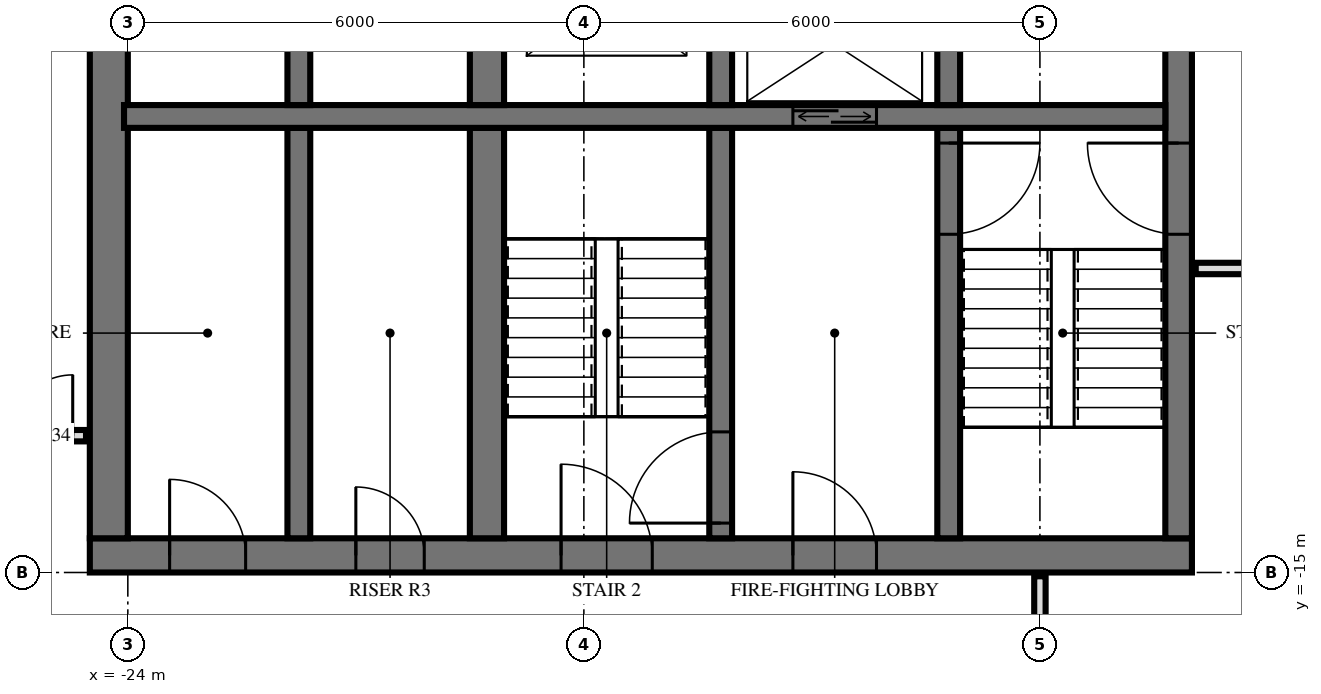
"""IFC4 building model, lengths in metres.
Left out: names, types, materials, properties, quantities, classifications, styles, units other than length and angle.
Written with IfcOpenShell. Run it as: python <this file> out.ifc"""

import sys

from ifc_helpers import new_model, si_unit, direction, frame, frame_2d, origin, place, context, subcontext, project, spatial, rectangle, extrude, element, fill, save


model = new_model("IFC4")
c1 = context("Model", 3, precision=1e-05, world=origin(), true_north=direction((0.0, 1.0)))
c2 = subcontext(c1, "Body", "Model", "MODEL_VIEW")
j1 = project(units=[si_unit("LENGTHUNIT", "METRE"), si_unit("PLANEANGLEUNIT", "RADIAN")], contexts=[c1])
p1 = place(None, origin())
s1 = spatial("IfcSite", under=j1, at=p1, CompositionType="ELEMENT")
p2 = place(p1, origin())
s2 = spatial("IfcBuilding", under=s1, at=p2, CompositionType="ELEMENT")
p3 = place(p2, frame((0.0, 0.0, 211.6)))
s3 = spatial("IfcBuildingStorey", under=s2, at=p3, CompositionType="ELEMENT", Elevation=211.6)
p4 = place(p3, frame((-24.5, -14.775, 0.0), z_axis=(0.0, 0.0, 1.0), x_axis=(1.0, 0.0, 0.0)))
e1 = element("IfcWall", 1, at=p4, inside=s3, PredefinedType="SHEAR", context=c2, shape_type="SweptSolid", body=[
    extrude(rectangle(XDim=14.5, YDim=0.45, at=frame_2d((7.25, 0.0))), origin(), (0.0, 0.0, 1.0), 3.5),
])
p5 = place(p4, frame((6.2, 0.0, 0.0)))
e2 = element("IfcOpeningElement", 2, at=p5, cuts=e1, PredefinedType="OPENING", context=c2, shape_type="SweptSolid", body=[
    extrude(rectangle(XDim=1.2, YDim=2.1, at=frame_2d((0.6, 1.05))), frame((0.0, 0.235, 0.0), z_axis=(0.0, -1.0, 0.0), x_axis=(1.0, 0.0, 0.0)), (0.0, 0.0, 1.0), 0.47),
])
p6 = place(p4, frame((9.25, 0.0, 0.0)))
e3 = element("IfcOpeningElement", 3, at=p6, cuts=e1, PredefinedType="OPENING", context=c2, shape_type="SweptSolid", body=[
    extrude(rectangle(XDim=1.1, YDim=2.1, at=frame_2d((0.55, 1.05))), frame((0.0, 0.235, 0.0), z_axis=(0.0, -1.0, 0.0), x_axis=(1.0, 0.0, 0.0)), (0.0, 0.0, 1.0), 0.47),
])
p7 = place(p4, frame((3.5, 0.0, 0.0)))
e4 = element("IfcOpeningElement", 4, at=p7, cuts=e1, PredefinedType="OPENING", context=c2, shape_type="SweptSolid", body=[
    extrude(rectangle(XDim=0.9, YDim=2.1, at=frame_2d((0.45, 1.05))), frame((0.0, 0.235, 0.0), z_axis=(0.0, -1.0, 0.0), x_axis=(1.0, 0.0, 0.0)), (0.0, 0.0, 1.0), 0.47),
])
p8 = place(p4, frame((1.05, 0.0, 0.0)))
e5 = element("IfcOpeningElement", 5, at=p8, cuts=e1, PredefinedType="OPENING", context=c2, shape_type="SweptSolid", body=[
    extrude(rectangle(XDim=1.0, YDim=2.1, at=frame_2d((0.5, 1.05))), frame((0.0, 0.235, 0.0), z_axis=(0.0, -1.0, 0.0), x_axis=(1.0, 0.0, 0.0)), (0.0, 0.0, 1.0), 0.47),
])
p9 = place(p3, frame((-10.175, -14.55, 0.0), z_axis=(0.0, 0.0, 1.0), x_axis=(0.0, 1.0, 0.0)))
e6 = element("IfcWall", 6, at=p9, inside=s3, PredefinedType="SHEAR", context=c2, shape_type="SweptSolid", body=[
    extrude(rectangle(XDim=14.1, YDim=0.35, at=frame_2d((7.05, 0.0))), origin(), (0.0, 0.0, 1.0), 3.5),
])
p10 = place(p9, frame((8.4, 0.0, 0.0)))
e7 = element("IfcOpeningElement", 7, at=p10, cuts=e6, PredefinedType="OPENING", context=c2, shape_type="SweptSolid", body=[
    extrude(rectangle(XDim=1.4, YDim=2.4, at=frame_2d((0.7, 1.2))), frame((0.0, 0.185, 0.0), z_axis=(0.0, -1.0, 0.0), x_axis=(1.0, 0.0, 0.0)), (0.0, 0.0, 1.0), 0.37),
])
p11 = place(p9, frame((10.0, 0.0, 0.0)))
e8 = element("IfcOpeningElement", 8, at=p11, cuts=e6, PredefinedType="OPENING", context=c2, shape_type="SweptSolid", body=[
    extrude(rectangle(XDim=1.4, YDim=2.4, at=frame_2d((0.7, 1.2))), frame((0.0, 0.185, 0.0), z_axis=(0.0, -1.0, 0.0), x_axis=(1.0, 0.0, 0.0)), (0.0, 0.0, 1.0), 0.37),
])
p12 = place(p9, frame((4.0, 0.0, 0.0)))
e9 = element("IfcOpeningElement", 9, at=p12, cuts=e6, PredefinedType="OPENING", context=c2, shape_type="SweptSolid", body=[
    extrude(rectangle(XDim=1.2, YDim=2.1, at=frame_2d((0.6, 1.05))), frame((0.0, 0.185, 0.0), z_axis=(0.0, -1.0, 0.0), x_axis=(1.0, 0.0, 0.0)), (0.0, 0.0, 1.0), 0.37),
])
p13 = place(p3, frame((-24.25, -14.55, 0.0), z_axis=(0.0, 0.0, 1.0), x_axis=(0.0, 1.0, 0.0)))
e10 = element("IfcWall", 10, at=p13, inside=s3, PredefinedType="SHEAR", context=c2, shape_type="SweptSolid", body=[
    extrude(rectangle(XDim=14.1, YDim=0.5, at=frame_2d((7.05, 0.0))), origin(), (0.0, 0.0, 1.0), 3.5),
])
p14 = place(p3, frame((-24.05, -9.0, 0.0), z_axis=(0.0, 0.0, 1.0), x_axis=(1.0, 0.0, 0.0)))
e11 = element("IfcWall", 11, at=p14, inside=s3, PredefinedType="SHEAR", context=c2, shape_type="SweptSolid", body=[
    extrude(rectangle(XDim=13.7, YDim=0.3, at=frame_2d((6.85, 0.0))), origin(), (0.0, 0.0, 1.0), 3.5),
])
p15 = place(p14, frame((8.8, 0.0, 0.0)))
e12 = element("IfcOpeningElement", 12, at=p15, cuts=e11, PredefinedType="OPENING", context=c2, shape_type="SweptSolid", body=[
    extrude(rectangle(XDim=1.1, YDim=2.1, at=frame_2d((0.55, 1.05))), frame((0.0, 0.16, 0.0), z_axis=(0.0, -1.0, 0.0), x_axis=(1.0, 0.0, 0.0)), (0.0, 0.0, 1.0), 0.32),
])
p16 = place(p3, frame((-13.2, -8.85, 0.0), z_axis=(0.0, 0.0, 1.0), x_axis=(0.0, 1.0, 0.0)))
e13 = element("IfcWall", 13, at=p16, inside=s3, PredefinedType="SHEAR", context=c2, shape_type="SweptSolid", body=[
    extrude(rectangle(XDim=2.3, YDim=0.3, at=frame_2d((1.15, 0.0))), origin(), (0.0, 0.0, 1.0), 3.5),
])
p17 = place(p3, frame((-13.2, -14.55, 0.0), z_axis=(0.0, 0.0, 1.0), x_axis=(0.0, 1.0, 0.0)))
e14 = element("IfcWall", 14, at=p17, inside=s3, PredefinedType="SHEAR", context=c2, shape_type="SweptSolid", body=[
    extrude(rectangle(XDim=5.4, YDim=0.3, at=frame_2d((2.7, 0.0))), origin(), (0.0, 0.0, 1.0), 3.5),
])
p18 = place(p17, frame((4.0, 0.0, 0.0)))
e15 = element("IfcOpeningElement", 15, at=p18, cuts=e14, PredefinedType="OPENING", context=c2, shape_type="SweptSolid", body=[
    extrude(rectangle(XDim=1.2, YDim=2.1, at=frame_2d((0.6, 1.05))), frame((0.0, 0.16, 0.0), z_axis=(0.0, -1.0, 0.0), x_axis=(1.0, 0.0, 0.0)), (0.0, 0.0, 1.0), 0.32),
])
p19 = place(p3, frame((-16.2, -8.85, 0.0), z_axis=(0.0, 0.0, 1.0), x_axis=(0.0, 1.0, 0.0)))
e16 = element("IfcWall", 16, at=p19, inside=s3, PredefinedType="SHEAR", context=c2, shape_type="SweptSolid", body=[
    extrude(rectangle(XDim=2.3, YDim=0.3, at=frame_2d((1.15, 0.0))), origin(), (0.0, 0.0, 1.0), 3.5),
])
p20 = place(p3, frame((-16.2, -14.55, 0.0), z_axis=(0.0, 0.0, 1.0), x_axis=(0.0, 1.0, 0.0)))
e17 = element("IfcWall", 17, at=p20, inside=s3, PredefinedType="SHEAR", context=c2, shape_type="SweptSolid", body=[
    extrude(rectangle(XDim=5.4, YDim=0.3, at=frame_2d((2.7, 0.0))), origin(), (0.0, 0.0, 1.0), 3.5),
])
p21 = place(p20, frame((0.2, 0.0, 0.0)))
e18 = element("IfcOpeningElement", 18, at=p21, cuts=e17, PredefinedType="OPENING", context=c2, shape_type="SweptSolid", body=[
    extrude(rectangle(XDim=1.2, YDim=2.1, at=frame_2d((0.6, 1.05))), frame((0.0, 0.16, 0.0), z_axis=(0.0, -1.0, 0.0), x_axis=(1.0, 0.0, 0.0)), (0.0, 0.0, 1.0), 0.32),
])
p22 = place(p3, frame((-19.275, -8.85, 0.0), z_axis=(0.0, 0.0, 1.0), x_axis=(0.0, 1.0, 0.0)))
e19 = element("IfcWall", 19, at=p22, inside=s3, PredefinedType="SHEAR", context=c2, shape_type="SweptSolid", body=[
    extrude(rectangle(XDim=2.3, YDim=0.45, at=frame_2d((1.15, 0.0))), origin(), (0.0, 0.0, 1.0), 3.5),
])
p23 = place(p3, frame((-19.275, -14.55, 0.0), z_axis=(0.0, 0.0, 1.0), x_axis=(0.0, 1.0, 0.0)))
e20 = element("IfcWall", 20, at=p23, inside=s3, PredefinedType="SHEAR", context=c2, shape_type="SweptSolid", body=[
    extrude(rectangle(XDim=5.4, YDim=0.45, at=frame_2d((2.7, 0.0))), origin(), (0.0, 0.0, 1.0), 3.5),
])
p24 = place(p3, frame((-21.75, -8.85, 0.0), z_axis=(0.0, 0.0, 1.0), x_axis=(0.0, 1.0, 0.0)))
e21 = element("IfcWall", 21, at=p24, inside=s3, PredefinedType="SHEAR", context=c2, shape_type="SweptSolid", body=[
    extrude(rectangle(XDim=2.3, YDim=0.3, at=frame_2d((1.15, 0.0))), origin(), (0.0, 0.0, 1.0), 3.5),
])
p25 = place(p3, frame((-21.75, -14.55, 0.0), z_axis=(0.0, 0.0, 1.0), x_axis=(0.0, 1.0, 0.0)))
e22 = element("IfcWall", 22, at=p25, inside=s3, PredefinedType="SHEAR", context=c2, shape_type="SweptSolid", body=[
    extrude(rectangle(XDim=5.4, YDim=0.3, at=frame_2d((2.7, 0.0))), origin(), (0.0, 0.0, 1.0), 3.5),
])
p26 = place(p3, frame((-12.0, -17.4, 0.0), z_axis=(0.0, 0.0, 1.0), x_axis=(0.0, 1.0, 0.0)))
e23 = element("IfcWall", 23, at=p26, inside=s3, PredefinedType="PARTITIONING", context=c2, shape_type="SweptSolid", body=[
    extrude(rectangle(XDim=2.35, YDim=0.15, at=frame_2d((1.175, 0.0))), origin(), (0.0, 0.0, 1.0), 3.22),
])
p27 = place(p26, frame((0.7, 0.0, 0.0)))
e24 = element("IfcOpeningElement", 24, at=p27, cuts=e23, PredefinedType="OPENING", context=c2, shape_type="SweptSolid", body=[
    extrude(rectangle(XDim=1.0, YDim=2.1, at=frame_2d((0.5, 1.05))), frame((0.0, 0.085, 0.0), z_axis=(0.0, -1.0, 0.0), x_axis=(1.0, 0.0, 0.0)), (0.0, 0.0, 1.0), 0.17),
])
p28 = place(p3, frame((-25.7, -13.2, 0.0), z_axis=(0.0, 0.0, 1.0), x_axis=(1.0, 0.0, 0.0)))
e25 = element("IfcWall", 25, at=p28, inside=s3, PredefinedType="PARTITIONING", context=c2, shape_type="SweptSolid", body=[
    extrude(rectangle(XDim=1.15, YDim=0.15, at=frame_2d((0.575, 0.0))), origin(), (0.0, 0.0, 1.0), 3.22),
])
p29 = place(p28, frame((0.175, 0.0, 0.0)))
e26 = element("IfcOpeningElement", 26, at=p29, cuts=e25, PredefinedType="OPENING", context=c2, shape_type="SweptSolid", body=[
    extrude(rectangle(XDim=0.8, YDim=2.1, at=frame_2d((0.4, 1.05))), frame((0.0, 0.085, 0.0), z_axis=(0.0, -1.0, 0.0), x_axis=(1.0, 0.0, 0.0)), (0.0, 0.0, 1.0), 0.17),
])
p30 = place(p3, frame((-9.95, -11.0, 0.0), z_axis=(0.0, 0.0, 1.0), x_axis=(1.0, 0.0, 0.0)))
e27 = element("IfcWall", 27, at=p30, inside=s3, PredefinedType="PARTITIONING", context=c2, shape_type="SweptSolid", body=[
    extrude(rectangle(XDim=19.9, YDim=0.15, at=frame_2d((9.95, 0.0))), origin(), (0.0, 0.0, 1.0), 3.22),
])
p31 = place(p30, frame((9.45, 0.0, 0.0)))
e28 = element("IfcOpeningElement", 28, at=p31, cuts=e27, PredefinedType="OPENING", context=c2, shape_type="SweptSolid", body=[
    extrude(rectangle(XDim=1.0, YDim=2.1, at=frame_2d((0.5, 1.05))), frame((0.0, 0.085, 0.0), z_axis=(0.0, -1.0, 0.0), x_axis=(1.0, 0.0, 0.0)), (0.0, 0.0, 1.0), 0.17),
])
p32 = place(p30, frame((15.45, 0.0, 0.0)))
e29 = element("IfcOpeningElement", 29, at=p32, cuts=e27, PredefinedType="OPENING", context=c2, shape_type="SweptSolid", body=[
    extrude(rectangle(XDim=1.0, YDim=2.1, at=frame_2d((0.5, 1.05))), frame((0.0, 0.085, 0.0), z_axis=(0.0, -1.0, 0.0), x_axis=(1.0, 0.0, 0.0)), (0.0, 0.0, 1.0), 0.17),
])
p33 = place(p15, origin())
e30 = element("IfcDoor", 30, at=p33, inside=s3, OperationType="DOUBLE_DOOR_SLIDING", PredefinedType="USERDEFINED", context=c2, shape_type="SweptSolid", body=[
    extrude(rectangle(XDim=1.1, YDim=2.1, at=frame_2d((0.55, 1.05))), frame((0.0, 0.025, 0.0), z_axis=(0.0, -1.0, 0.0), x_axis=(1.0, 0.0, 0.0)), (0.0, 0.0, 1.0), 0.05),
])
fill(e12, e30)
p34 = place(p12, origin())
e31 = element("IfcDoor", 31, at=p34, inside=s3, OperationType="SINGLE_SWING_LEFT", PredefinedType="DOOR", context=c2, shape_type="SweptSolid", body=[
    extrude(rectangle(XDim=1.2, YDim=2.1, at=frame_2d((0.6, 1.05))), frame((0.0, 0.025, 0.0), z_axis=(0.0, -1.0, 0.0), x_axis=(1.0, 0.0, 0.0)), (0.0, 0.0, 1.0), 0.05),
])
fill(e9, e31)
p35 = place(p5, origin())
e32 = element("IfcDoor", 32, at=p35, inside=s3, OperationType="SINGLE_SWING_RIGHT", PredefinedType="DOOR", context=c2, shape_type="SweptSolid", body=[
    extrude(rectangle(XDim=1.2, YDim=2.1, at=frame_2d((0.6, 1.05))), frame((0.0, 0.025, 0.0), z_axis=(0.0, -1.0, 0.0), x_axis=(1.0, 0.0, 0.0)), (0.0, 0.0, 1.0), 0.05),
])
fill(e2, e32)
p36 = place(p6, origin())
e33 = element("IfcDoor", 33, at=p36, inside=s3, OperationType="SINGLE_SWING_RIGHT", PredefinedType="DOOR", context=c2, shape_type="SweptSolid", body=[
    extrude(rectangle(XDim=1.1, YDim=2.1, at=frame_2d((0.55, 1.05))), frame((0.0, 0.025, 0.0), z_axis=(0.0, -1.0, 0.0), x_axis=(1.0, 0.0, 0.0)), (0.0, 0.0, 1.0), 0.05),
])
fill(e3, e33)
p37 = place(p7, origin())
e34 = element("IfcDoor", 34, at=p37, inside=s3, OperationType="SINGLE_SWING_RIGHT", PredefinedType="DOOR", context=c2, shape_type="SweptSolid", body=[
    extrude(rectangle(XDim=0.9, YDim=2.1, at=frame_2d((0.45, 1.05))), frame((0.0, 0.025, 0.0), z_axis=(0.0, -1.0, 0.0), x_axis=(1.0, 0.0, 0.0)), (0.0, 0.0, 1.0), 0.05),
])
fill(e4, e34)
p38 = place(p8, origin())
e35 = element("IfcDoor", 35, at=p38, inside=s3, OperationType="SINGLE_SWING_RIGHT", PredefinedType="DOOR", context=c2, shape_type="SweptSolid", body=[
    extrude(rectangle(XDim=1.0, YDim=2.1, at=frame_2d((0.5, 1.05))), frame((0.0, 0.025, 0.0), z_axis=(0.0, -1.0, 0.0), x_axis=(1.0, 0.0, 0.0)), (0.0, 0.0, 1.0), 0.05),
])
fill(e5, e35)
p39 = place(p18, frame((0.6, 0.0, 0.0), z_axis=(0.0, 0.0, 1.0), x_axis=(-1.0, 0.0, 0.0)))
e36 = element("IfcDoor", 36, at=p39, inside=s3, OperationType="SINGLE_SWING_RIGHT", PredefinedType="DOOR", context=c2, shape_type="SweptSolid", body=[
    extrude(rectangle(XDim=1.2, YDim=2.1, at=frame_2d((0.0, 1.05))), frame((0.0, -0.025, 0.0), z_axis=(0.0, 1.0, 0.0), x_axis=(-1.0, 0.0, 0.0)), (0.0, 0.0, 1.0), 0.05),
])
fill(e15, e36)
p40 = place(p21, origin())
e37 = element("IfcDoor", 37, at=p40, inside=s3, OperationType="SINGLE_SWING_RIGHT", PredefinedType="DOOR", context=c2, shape_type="SweptSolid", body=[
    extrude(rectangle(XDim=1.2, YDim=2.1, at=frame_2d((0.6, 1.05))), frame((0.0, 0.025, 0.0), z_axis=(0.0, -1.0, 0.0), x_axis=(1.0, 0.0, 0.0)), (0.0, 0.0, 1.0), 0.05),
])
fill(e18, e37)
p41 = place(p29, origin())
e38 = element("IfcDoor", 38, at=p41, inside=s3, OperationType="SINGLE_SWING_LEFT", PredefinedType="DOOR", context=c2, shape_type="SweptSolid", body=[
    extrude(rectangle(XDim=0.8, YDim=2.1, at=frame_2d((0.4, 1.05))), frame((0.0, 0.025, 0.0), z_axis=(0.0, -1.0, 0.0), x_axis=(1.0, 0.0, 0.0)), (0.0, 0.0, 1.0), 0.05),
])
fill(e26, e38)
save(model, sys.argv[1])
